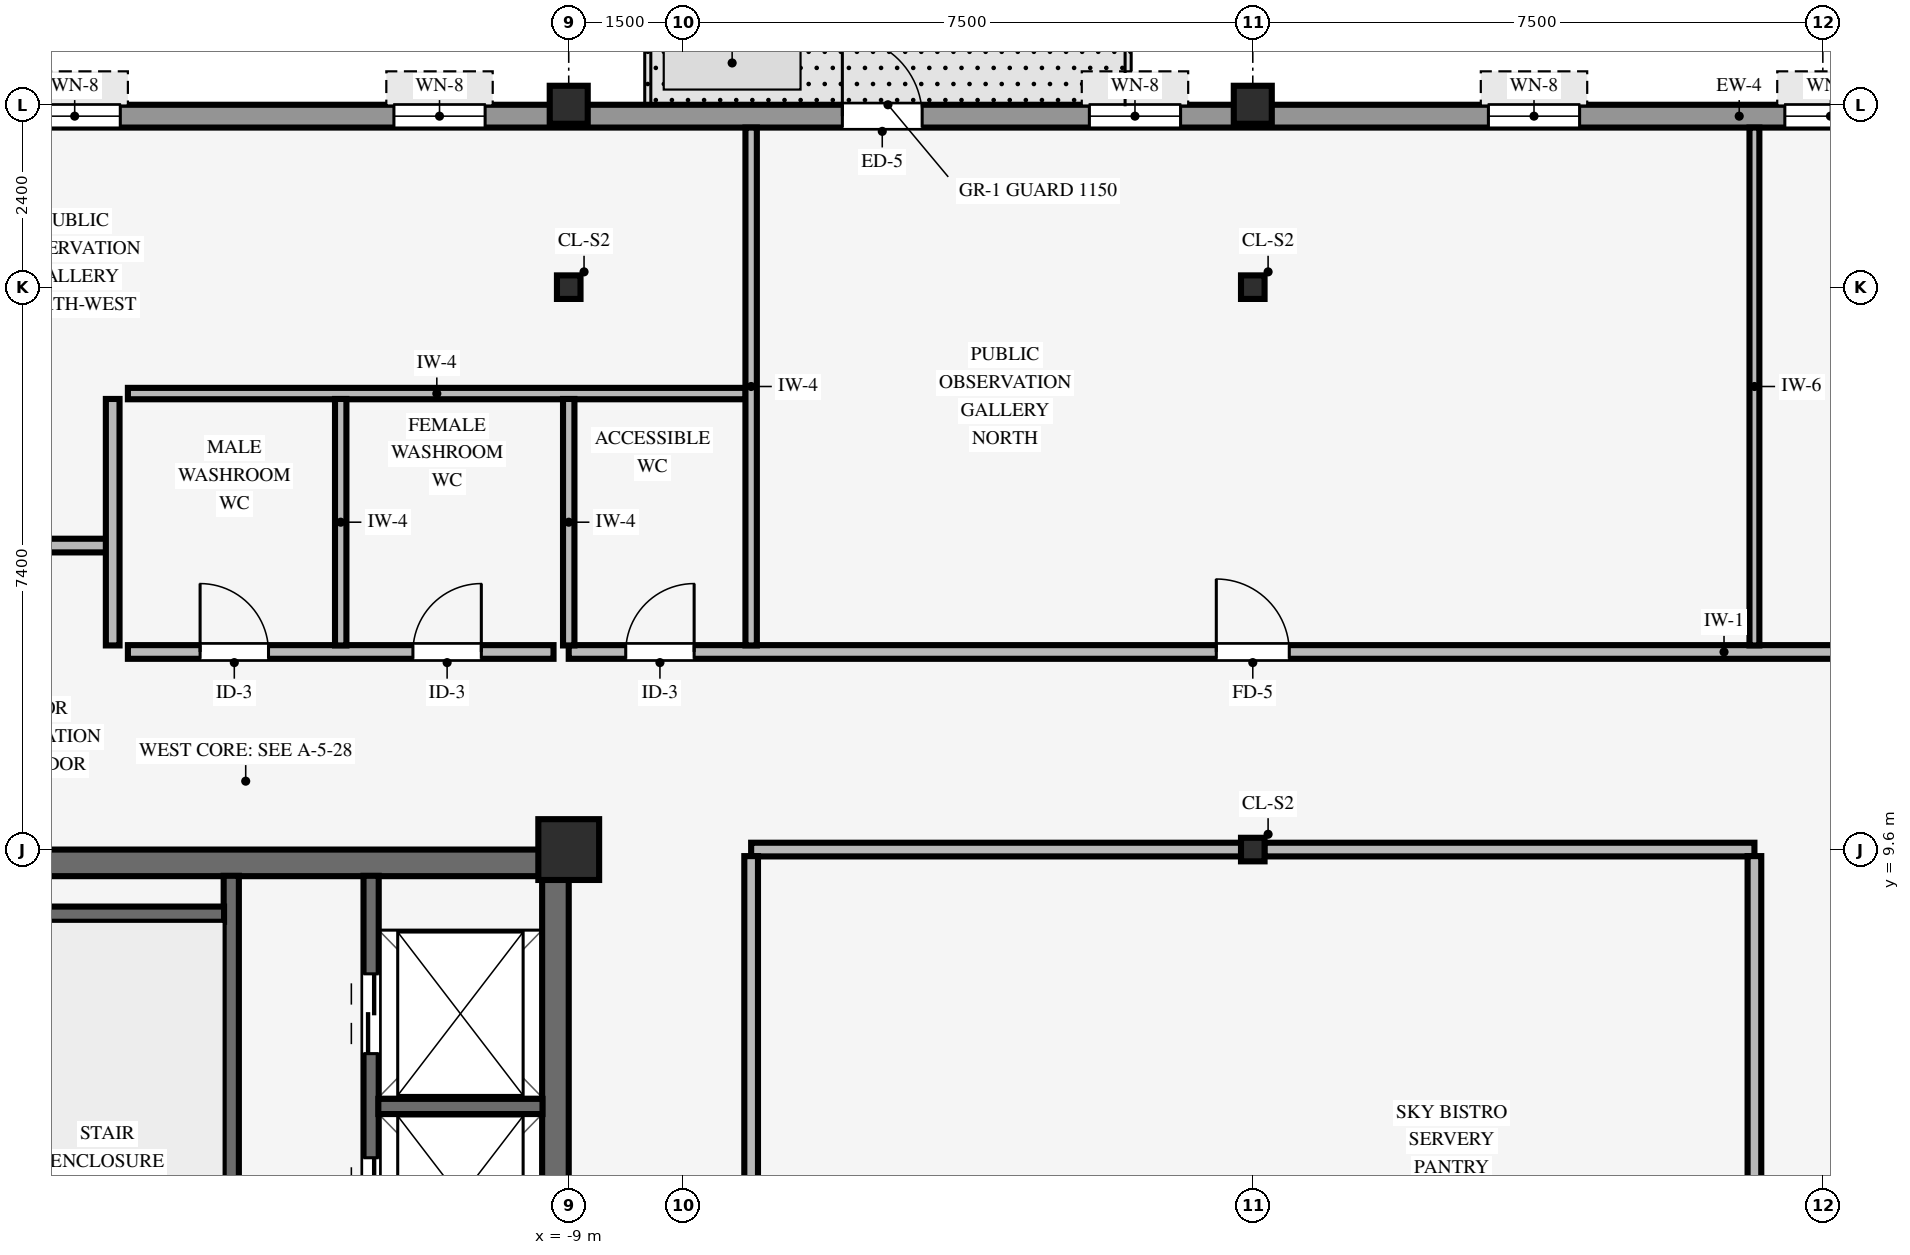
"""IFC4 building model, lengths in metres.
Left out: names, types, materials, properties, quantities, classifications, styles, units other than length and angle.
Written with IfcOpenShell. Run it as: python <this file> out.ifc"""

import sys

from ifc_helpers import new_model, si_unit, direction, frame, frame_2d, origin, origin_2d, place, context, subcontext, project, spatial, rectangle, hollow_rectangle, i_section, extrude, source, transform, mapped, element, fill, save


model = new_model("IFC4")
c1 = context("Model", 3, precision=1e-05, world=origin(), true_north=direction((0.0, 1.0)))
c2 = subcontext(c1, "Body", "Model", "MODEL_VIEW")
j1 = project(units=[si_unit("LENGTHUNIT", "METRE"), si_unit("PLANEANGLEUNIT", "RADIAN")], contexts=[c1])
p1 = place(None, origin())
s1 = spatial("IfcSite", under=j1, at=p1, CompositionType="ELEMENT")
p2 = place(p1, origin())
s2 = spatial("IfcBuilding", under=s1, at=p2, CompositionType="ELEMENT")
p3 = place(p2, frame((0.0, 0.0, 283.5)))
s3 = spatial("IfcBuildingStorey", under=s2, at=p3, CompositionType="ELEMENT", Elevation=283.5)
p4 = place(p3, frame((-17.5, 9.425, 0.0), z_axis=(0.0, 0.0, 1.0), x_axis=(1.0, 0.0, 0.0)))
e1 = element("IfcWall", 1, at=p4, inside=s3, PredefinedType="SHEAR", context=c2, shape_type="SweptSolid", body=[
    extrude(rectangle(XDim=8.5, YDim=0.35, at=frame_2d((4.25, 0.0))), origin(), (0.0, 0.0, 1.0), 3.25),
])
p5 = place(p3, frame((-9.175, -9.255, 0.0), z_axis=(0.0, 0.0, 1.0), x_axis=(0.0, 1.0, 0.0)))
e2 = element("IfcWall", 2, at=p5, inside=s3, PredefinedType="SHEAR", context=c2, shape_type="SweptSolid", body=[
    extrude(rectangle(XDim=18.51, YDim=0.35, at=frame_2d((9.255, 0.0))), origin(), (0.0, 0.0, 1.0), 3.25),
])
p6 = place(p5, frame((8.655, 0.0, 0.0)))
e3 = element("IfcOpeningElement", 3, at=p6, cuts=e2, PredefinedType="OPENING", context=c2, shape_type="SweptSolid", body=[
    extrude(rectangle(XDim=1.2, YDim=2.15, at=frame_2d((0.6, 1.075))), frame((0.0, 0.185, 0.0), z_axis=(0.0, -1.0, 0.0), x_axis=(1.0, 0.0, 0.0)), (0.0, 0.0, 1.0), 0.37),
])
p7 = place(p3, frame((-9.0, 9.6, 0.0), z_axis=(0.0, 0.0, 1.0), x_axis=(1.0, 0.0, 0.0)))
e4 = element("IfcColumn", 4, at=p7, inside=s3, PredefinedType="COLUMN", context=c2, shape_type="SweptSolid", body=[
    extrude(rectangle(XDim=0.8, YDim=0.8, at=origin_2d()), origin(), (0.0, 0.0, 1.0), 3.25),
])
for number, where, z_axis, x_axis in (
    (5, (-9.0, 19.4, 0.0), (0.0, 0.0, 1.0), (1.0, 0.0, 0.0)),
    (6, (0.0, 19.4, 0.0), (0.0, 0.0, 1.0), (1.0, 0.0, 0.0)),
):
    element("IfcColumn", number, at=place(p3, frame(where, z_axis=z_axis, x_axis=x_axis)), inside=s3, PredefinedType="COLUMN", context=c2, shape_type="SweptSolid", body=[
        extrude(hollow_rectangle(XDim=0.5, YDim=0.5, WallThickness=0.032, InnerFilletRadius=0.032, OuterFilletRadius=0.064, at=origin_2d()), origin(), (0.0, 0.0, 1.0), 3.25),
    ])
for number, where, z_axis, x_axis in (
    (7, (0.0, 9.6, 0.0), (0.0, 0.0, 1.0), (1.0, 0.0, 0.0)),
    (8, (0.0, 17.0, 0.0), (0.0, 0.0, 1.0), (1.0, 0.0, 0.0)),
    (9, (-9.0, 17.0, 0.0), (0.0, 0.0, 1.0), (1.0, 0.0, 0.0)),
):
    element("IfcColumn", number, at=place(p3, frame(where, z_axis=z_axis, x_axis=x_axis)), inside=s3, PredefinedType="COLUMN", context=c2, shape_type="SweptSolid", body=[
        extrude(i_section(OverallWidth=0.31, OverallDepth=0.31, WebThickness=0.015, FlangeThickness=0.015, FilletRadius=0.015, at=origin_2d()), origin(), (0.0, 0.0, 1.0), 3.25),
    ])
p8 = place(p3, frame((-18.9, 19.25, 0.0), z_axis=(0.0, 0.0, 1.0), x_axis=(1.0, 0.0, 0.0)))
e10 = element("IfcWall", 10, at=p8, inside=s3, PredefinedType="STANDARD", context=c2, shape_type="SweptSolid", body=[
    extrude(rectangle(XDim=35.6, YDim=0.3, at=frame_2d((17.8, 0.0))), origin(), (0.0, 0.0, 1.0), 3.24),
])
p9 = place(p8, frame((13.5, 0.0, 0.0)))
e11 = element("IfcOpeningElement", 11, at=p9, cuts=e10, PredefinedType="OPENING", context=c2, shape_type="SweptSolid", body=[
    extrude(rectangle(XDim=1.05, YDim=2.1, at=frame_2d((0.525, 1.05))), frame((0.0, 0.16, 0.0), z_axis=(0.0, -1.0, 0.0), x_axis=(1.0, 0.0, 0.0)), (0.0, 0.0, 1.0), 0.32),
])
p10 = place(p8, frame((2.8, 0.0, 0.8)))
e12 = element("IfcOpeningElement", 12, at=p10, cuts=e10, PredefinedType="OPENING", context=c2, shape_type="SweptSolid", body=[
    extrude(rectangle(XDim=1.2, YDim=1.48, at=frame_2d((0.6, 0.74))), frame((0.0, 0.16, 0.0), z_axis=(0.0, -1.0, 0.0), x_axis=(1.0, 0.0, 0.0)), (0.0, 0.0, 1.0), 0.32),
])
p11 = place(p8, frame((7.6, 0.0, 0.8)))
e13 = element("IfcOpeningElement", 13, at=p11, cuts=e10, PredefinedType="OPENING", context=c2, shape_type="SweptSolid", body=[
    extrude(rectangle(XDim=1.2, YDim=1.48, at=frame_2d((0.6, 0.74))), frame((0.0, 0.16, 0.0), z_axis=(0.0, -1.0, 0.0), x_axis=(1.0, 0.0, 0.0)), (0.0, 0.0, 1.0), 0.32),
])
p12 = place(p8, frame((16.75, 0.0, 0.8)))
e14 = element("IfcOpeningElement", 14, at=p12, cuts=e10, PredefinedType="OPENING", context=c2, shape_type="SweptSolid", body=[
    extrude(rectangle(XDim=1.2, YDim=1.48, at=frame_2d((0.6, 0.74))), frame((0.0, 0.16, 0.0), z_axis=(0.0, -1.0, 0.0), x_axis=(1.0, 0.0, 0.0)), (0.0, 0.0, 1.0), 0.32),
])
p13 = place(p8, frame((22.0, 0.0, 0.8)))
e15 = element("IfcOpeningElement", 15, at=p13, cuts=e10, PredefinedType="OPENING", context=c2, shape_type="SweptSolid", body=[
    extrude(rectangle(XDim=1.2, YDim=1.48, at=frame_2d((0.6, 0.74))), frame((0.0, 0.16, 0.0), z_axis=(0.0, -1.0, 0.0), x_axis=(1.0, 0.0, 0.0)), (0.0, 0.0, 1.0), 0.32),
])
p14 = place(p8, frame((25.9, 0.0, 0.8)))
e16 = element("IfcOpeningElement", 16, at=p14, cuts=e10, PredefinedType="OPENING", context=c2, shape_type="SweptSolid", body=[
    extrude(rectangle(XDim=1.2, YDim=1.48, at=frame_2d((0.6, 0.74))), frame((0.0, 0.16, 0.0), z_axis=(0.0, -1.0, 0.0), x_axis=(1.0, 0.0, 0.0)), (0.0, 0.0, 1.0), 0.32),
])
p15 = place(p8, frame((31.6, 0.0, 0.8)))
e17 = element("IfcOpeningElement", 17, at=p15, cuts=e10, PredefinedType="OPENING", context=c2, shape_type="SweptSolid", body=[
    extrude(rectangle(XDim=1.2, YDim=1.48, at=frame_2d((0.6, 0.74))), frame((0.0, 0.16, 0.0), z_axis=(0.0, -1.0, 0.0), x_axis=(1.0, 0.0, 0.0)), (0.0, 0.0, 1.0), 0.32),
])
p16 = place(p3, frame((-13.44, 0.9, 0.0), z_axis=(0.0, 0.0, 1.0), x_axis=(0.0, 1.0, 0.0)))
e18 = element("IfcWall", 18, at=p16, inside=s3, PredefinedType="SHEAR", context=c2, shape_type="SweptSolid", body=[
    extrude(rectangle(XDim=8.355, YDim=0.2, at=frame_2d((4.177, 0.0))), origin(), (0.0, 0.0, 1.0), 3.25),
])
p17 = place(p16, frame((1.53, 0.0, 0.0), z_axis=(0.0, 0.0, 1.0), x_axis=(-1.0, 0.0, 0.0)))
e19 = element("IfcOpeningElement", 19, at=p17, cuts=e18, PredefinedType="OPENING", context=c2, shape_type="SweptSolid", body=[
    extrude(rectangle(XDim=1.1, YDim=2.15, at=frame_2d((0.55, 1.075))), frame((0.0, 0.11, 0.0), z_axis=(0.0, -1.0, 0.0), x_axis=(1.0, 0.0, 0.0)), (0.0, 0.0, 1.0), 0.22),
])
p18 = place(p3, frame((-17.155, 8.75, 0.0), z_axis=(0.0, 0.0, 1.0), x_axis=(1.0, 0.0, 0.0)))
e20 = element("IfcWall", 20, at=p18, inside=s3, PredefinedType="SHEAR", context=c2, shape_type="SweptSolid", body=[
    extrude(rectangle(XDim=3.62, YDim=0.2, at=frame_2d((1.81, 0.0))), origin(), (0.0, 0.0, 1.0), 3.25),
])
p19 = place(p3, frame((-11.6, 1.3, 0.0), z_axis=(0.0, 0.0, 1.0), x_axis=(0.0, 1.0, 0.0)))
e21 = element("IfcWall", 21, at=p19, inside=s3, PredefinedType="SHEAR", context=c2, shape_type="SweptSolid", body=[
    extrude(rectangle(XDim=7.955, YDim=0.2, at=frame_2d((3.978, 0.0))), origin(), (0.0, 0.0, 1.0), 3.25),
])
p20 = place(p19, frame((0.775, 0.0, 0.0)))
e22 = element("IfcOpeningElement", 22, at=p20, cuts=e21, PredefinedType="OPENING", context=c2, shape_type="SweptSolid", body=[
    extrude(rectangle(XDim=1.05, YDim=2.15, at=frame_2d((0.525, 1.075))), frame((0.0, 0.11, 0.0), z_axis=(0.0, -1.0, 0.0), x_axis=(1.0, 0.0, 0.0)), (0.0, 0.0, 1.0), 0.22),
])
p21 = place(p19, frame((3.195, 0.0, 0.0)))
e23 = element("IfcOpeningElement", 23, at=p21, cuts=e21, PredefinedType="OPENING", context=c2, shape_type="SweptSolid", body=[
    extrude(rectangle(XDim=1.05, YDim=2.15, at=frame_2d((0.525, 1.075))), frame((0.0, 0.11, 0.0), z_axis=(0.0, -1.0, 0.0), x_axis=(1.0, 0.0, 0.0)), (0.0, 0.0, 1.0), 0.22),
])
p22 = place(p19, frame((5.615, 0.0, 0.0)))
e24 = element("IfcOpeningElement", 24, at=p22, cuts=e21, PredefinedType="OPENING", context=c2, shape_type="SweptSolid", body=[
    extrude(rectangle(XDim=1.05, YDim=2.15, at=frame_2d((0.525, 1.075))), frame((0.0, 0.11, 0.0), z_axis=(0.0, -1.0, 0.0), x_axis=(1.0, 0.0, 0.0)), (0.0, 0.0, 1.0), 0.22),
])
p23 = place(p3, frame((-11.505, 6.22, 0.0), z_axis=(0.0, 0.0, 1.0), x_axis=(1.0, 0.0, 0.0)))
e25 = element("IfcWall", 25, at=p23, inside=s3, PredefinedType="SHEAR", context=c2, shape_type="SweptSolid", body=[
    extrude(rectangle(XDim=2.16, YDim=0.2, at=frame_2d((1.08, 0.0))), origin(), (0.0, 0.0, 1.0), 3.25),
])
for number, where, z_axis, x_axis in (
    (26, (-6.6, 9.6, 0.0), (0.0, 0.0, 1.0), (1.0, 0.0, 0.0)),
    (27, (0.151, 9.6, 0.0), (0.0, 0.0, 1.0), (1.0, 0.0, 0.0)),
):
    element("IfcWall", number, at=place(p3, frame(where, z_axis=z_axis, x_axis=x_axis)), inside=s3, PredefinedType="PARTITIONING", context=c2, shape_type="SweptSolid", body=[
        extrude(rectangle(XDim=6.449, YDim=0.18, at=frame_2d((3.225, 0.0))), origin(), (0.0, 0.0, 1.0), 2.285),
    ])
p24 = place(p3, frame((-14.8, 12.2, 0.0), z_axis=(0.0, 0.0, 1.0), x_axis=(1.0, 0.0, 0.0)))
e28 = element("IfcWall", 28, at=p24, inside=s3, PredefinedType="PARTITIONING", context=c2, shape_type="SweptSolid", body=[
    extrude(rectangle(XDim=5.6, YDim=0.18, at=frame_2d((2.8, 0.0))), origin(), (0.0, 0.0, 1.0), 3.24),
])
p25 = place(p24, frame((0.95, 0.0, 0.0)))
e29 = element("IfcOpeningElement", 29, at=p25, cuts=e28, PredefinedType="OPENING", context=c2, shape_type="SweptSolid", body=[
    extrude(rectangle(XDim=0.9, YDim=2.1, at=frame_2d((0.45, 1.05))), frame((0.0, 0.1, 0.0), z_axis=(0.0, -1.0, 0.0), x_axis=(1.0, 0.0, 0.0)), (0.0, 0.0, 1.0), 0.2),
])
p26 = place(p24, frame((3.75, 0.0, 0.0)))
e30 = element("IfcOpeningElement", 30, at=p26, cuts=e28, PredefinedType="OPENING", context=c2, shape_type="SweptSolid", body=[
    extrude(rectangle(XDim=0.9, YDim=2.1, at=frame_2d((0.45, 1.05))), frame((0.0, 0.1, 0.0), z_axis=(0.0, -1.0, 0.0), x_axis=(1.0, 0.0, 0.0)), (0.0, 0.0, 1.0), 0.2),
])
p27 = place(p3, frame((-9.0, 12.2, 0.0), z_axis=(0.0, 0.0, 1.0), x_axis=(1.0, 0.0, 0.0)))
e31 = element("IfcWall", 31, at=p27, inside=s3, PredefinedType="PARTITIONING", context=c2, shape_type="SweptSolid", body=[
    extrude(rectangle(XDim=24.8, YDim=0.18, at=frame_2d((12.4, 0.0))), origin(), (0.0, 0.0, 1.0), 3.24),
])
p28 = place(p27, frame((8.52, 0.0, 0.0)))
e32 = element("IfcOpeningElement", 32, at=p28, cuts=e31, PredefinedType="OPENING", context=c2, shape_type="SweptSolid", body=[
    extrude(rectangle(XDim=0.96, YDim=2.1, at=frame_2d((0.48, 1.05))), frame((0.0, 0.1, 0.0), z_axis=(0.0, -1.0, 0.0), x_axis=(1.0, 0.0, 0.0)), (0.0, 0.0, 1.0), 0.2),
])
p29 = place(p27, frame((20.92, 0.0, 0.0)))
e33 = element("IfcOpeningElement", 33, at=p29, cuts=e31, PredefinedType="OPENING", context=c2, shape_type="SweptSolid", body=[
    extrude(rectangle(XDim=0.96, YDim=2.1, at=frame_2d((0.48, 1.05))), frame((0.0, 0.1, 0.0), z_axis=(0.0, -1.0, 0.0), x_axis=(1.0, 0.0, 0.0)), (0.0, 0.0, 1.0), 0.2),
])
p30 = place(p27, frame((0.75, 0.0, 0.0)))
e34 = element("IfcOpeningElement", 34, at=p30, cuts=e31, PredefinedType="OPENING", context=c2, shape_type="SweptSolid", body=[
    extrude(rectangle(XDim=0.9, YDim=2.1, at=frame_2d((0.45, 1.05))), frame((0.0, 0.1, 0.0), z_axis=(0.0, -1.0, 0.0), x_axis=(1.0, 0.0, 0.0)), (0.0, 0.0, 1.0), 0.2),
])
p31 = place(p3, frame((-20.0, 13.6, 0.0), z_axis=(0.0, 0.0, 1.0), x_axis=(1.0, 0.0, 0.0)))
e35 = element("IfcWall", 35, at=p31, inside=s3, PredefinedType="PARTITIONING", context=c2, shape_type="SweptSolid", body=[
    extrude(rectangle(XDim=4.914, YDim=0.18, at=frame_2d((2.457, 0.0))), origin(), (0.0, 0.0, 1.0), 3.24),
])
p32 = place(p31, frame((1.977, 0.0, 0.0)))
e36 = element("IfcOpeningElement", 36, at=p32, cuts=e35, PredefinedType="OPENING", context=c2, shape_type="SweptSolid", body=[
    extrude(rectangle(XDim=0.96, YDim=2.1, at=frame_2d((0.48, 1.05))), frame((0.0, 0.1, 0.0), z_axis=(0.0, -1.0, 0.0), x_axis=(1.0, 0.0, 0.0)), (0.0, 0.0, 1.0), 0.2),
])
p33 = place(p3, frame((-14.8, 15.6, 0.0), z_axis=(0.0, 0.0, 1.0), x_axis=(1.0, 0.0, 0.0)))
e37 = element("IfcWall", 37, at=p33, inside=s3, PredefinedType="PARTITIONING", context=c2, shape_type="SweptSolid", body=[
    extrude(rectangle(XDim=8.129, YDim=0.15, at=frame_2d((4.064, 0.0))), origin(), (0.0, 0.0, 1.0), 3.24),
])
p34 = place(p3, frame((-15.0, 12.286, 0.0), z_axis=(0.0, 0.0, 1.0), x_axis=(0.0, 1.0, 0.0)))
e38 = element("IfcWall", 38, at=p34, inside=s3, PredefinedType="PARTITIONING", context=c2, shape_type="SweptSolid", body=[
    extrude(rectangle(XDim=3.243, YDim=0.18, at=frame_2d((1.622, 0.0))), origin(), (0.0, 0.0, 1.0), 3.24),
])
p35 = place(p3, frame((-12.0, 12.286, 0.0), z_axis=(0.0, 0.0, 1.0), x_axis=(0.0, 1.0, 0.0)))
e39 = element("IfcWall", 39, at=p35, inside=s3, PredefinedType="PARTITIONING", context=c2, shape_type="SweptSolid", body=[
    extrude(rectangle(XDim=3.243, YDim=0.15, at=frame_2d((1.622, 0.0))), origin(), (0.0, 0.0, 1.0), 3.24),
])
p36 = place(p3, frame((-9.0, 12.286, 0.0), z_axis=(0.0, 0.0, 1.0), x_axis=(0.0, 1.0, 0.0)))
e40 = element("IfcWall", 40, at=p36, inside=s3, PredefinedType="PARTITIONING", context=c2, shape_type="SweptSolid", body=[
    extrude(rectangle(XDim=3.243, YDim=0.15, at=frame_2d((1.622, 0.0))), origin(), (0.0, 0.0, 1.0), 2.772),
])
p37 = place(p3, frame((-6.6, 1.336, 0.0), z_axis=(0.0, 0.0, 1.0), x_axis=(0.0, 1.0, 0.0)))
e41 = element("IfcWall", 41, at=p37, inside=s3, PredefinedType="PARTITIONING", context=c2, shape_type="SweptSolid", body=[
    extrude(rectangle(XDim=8.178, YDim=0.18, at=frame_2d((4.089, 0.0))), origin(), (0.0, 0.0, 1.0), 3.24),
])
p38 = place(p3, frame((-6.6, 12.286, 0.0), z_axis=(0.0, 0.0, 1.0), x_axis=(0.0, 1.0, 0.0)))
e42 = element("IfcWall", 42, at=p38, inside=s3, PredefinedType="PARTITIONING", context=c2, shape_type="SweptSolid", body=[
    extrude(rectangle(XDim=6.814, YDim=0.15, at=frame_2d((3.407, 0.0))), origin(), (0.0, 0.0, 1.0), 3.24),
])
p39 = place(p3, frame((6.6, 1.336, 0.0), z_axis=(0.0, 0.0, 1.0), x_axis=(0.0, 1.0, 0.0)))
e43 = element("IfcWall", 43, at=p39, inside=s3, PredefinedType="PARTITIONING", context=c2, shape_type="SweptSolid", body=[
    extrude(rectangle(XDim=8.178, YDim=0.18, at=frame_2d((4.089, 0.0))), origin(), (0.0, 0.0, 1.0), 3.24),
])
p40 = place(p3, frame((6.6, 12.286, 0.0), z_axis=(0.0, 0.0, 1.0), x_axis=(0.0, 1.0, 0.0)))
e44 = element("IfcWall", 44, at=p40, inside=s3, PredefinedType="PARTITIONING", context=c2, shape_type="SweptSolid", body=[
    extrude(rectangle(XDim=6.814, YDim=0.13, at=frame_2d((3.407, 0.0))), origin(), (0.0, 0.0, 1.0), 3.24),
])
m1 = source(origin(), c2, "Body", "SweptSolid", [
    extrude(rectangle(XDim=1.05, YDim=2.1, at=frame_2d((0.525, 1.05))), frame((0.0, 0.025, 0.0), z_axis=(0.0, -1.0, 0.0), x_axis=(1.0, 0.0, 0.0)), (0.0, 0.0, 1.0), 0.05),
])
p41 = place(p9, origin())
e45 = element("IfcDoor", 45, at=p41, inside=s3, OperationType="SINGLE_SWING_LEFT", PredefinedType="DOOR", context=c2, shape_type="MappedRepresentation", body=[
    mapped(m1, transform((0.0, 0.0, 0.0), scale=1.0)),
])
fill(e11, e45)
m2 = source(origin(), c2, "Body", "SweptSolid", [
    extrude(rectangle(XDim=1.2, YDim=1.48, at=frame_2d((0.6, 0.74))), frame((0.0, 0.03, 0.0), z_axis=(0.0, -1.0, 0.0), x_axis=(1.0, 0.0, 0.0)), (0.0, 0.0, 1.0), 0.06),
])
p42 = place(p10, origin())
e46 = element("IfcWindow", 46, at=p42, inside=s3, PartitioningType="SINGLE_PANEL", PredefinedType="WINDOW", context=c2, shape_type="MappedRepresentation", body=[
    mapped(m2, transform((0.0, 0.0, 0.0), scale=1.0)),
])
fill(e12, e46)
p43 = place(p11, origin())
e47 = element("IfcWindow", 47, at=p43, inside=s3, PartitioningType="SINGLE_PANEL", PredefinedType="WINDOW", context=c2, shape_type="MappedRepresentation", body=[
    mapped(m2, transform((0.0, 0.0, 0.0), scale=1.0)),
])
fill(e13, e47)
p44 = place(p12, origin())
e48 = element("IfcWindow", 48, at=p44, inside=s3, PartitioningType="SINGLE_PANEL", PredefinedType="WINDOW", context=c2, shape_type="MappedRepresentation", body=[
    mapped(m2, transform((0.0, 0.0, 0.0), scale=1.0)),
])
fill(e14, e48)
p45 = place(p13, origin())
e49 = element("IfcWindow", 49, at=p45, inside=s3, PartitioningType="SINGLE_PANEL", PredefinedType="WINDOW", context=c2, shape_type="MappedRepresentation", body=[
    mapped(m2, transform((0.0, 0.0, 0.0), scale=1.0)),
])
fill(e15, e49)
p46 = place(p14, origin())
e50 = element("IfcWindow", 50, at=p46, inside=s3, PartitioningType="SINGLE_PANEL", PredefinedType="WINDOW", context=c2, shape_type="MappedRepresentation", body=[
    mapped(m2, transform((0.0, 0.0, 0.0), scale=1.0)),
])
fill(e16, e50)
m3 = source(origin(), c2, "Body", "SweptSolid", [
    extrude(rectangle(XDim=1.05, YDim=2.15, at=frame_2d((0.525, 1.075))), frame((0.0, 0.025, 0.0), z_axis=(0.0, -1.0, 0.0), x_axis=(1.0, 0.0, 0.0)), (0.0, 0.0, 1.0), 0.05),
])
p47 = place(p21, origin())
e51 = element("IfcDoor", 51, at=p47, inside=s3, OperationType="DOUBLE_DOOR_SLIDING", PredefinedType="DOOR", context=c2, shape_type="MappedRepresentation", body=[
    mapped(m3, transform((0.0, 0.0, 0.0), scale=1.0)),
])
fill(e23, e51)
p48 = place(p22, origin())
e52 = element("IfcDoor", 52, at=p48, inside=s3, OperationType="DOUBLE_DOOR_SLIDING", PredefinedType="DOOR", context=c2, shape_type="MappedRepresentation", body=[
    mapped(m3, transform((0.0, 0.0, 0.0), scale=1.0)),
])
fill(e24, e52)
m4 = source(origin(), c2, "Body", "SweptSolid", [
    extrude(rectangle(XDim=0.96, YDim=2.1, at=frame_2d((0.48, 1.05))), frame((0.0, 0.025, 0.0), z_axis=(0.0, -1.0, 0.0), x_axis=(1.0, 0.0, 0.0)), (0.0, 0.0, 1.0), 0.05),
])
p49 = place(p28, origin())
e53 = element("IfcDoor", 53, at=p49, inside=s3, OperationType="SINGLE_SWING_LEFT", PredefinedType="DOOR", context=c2, shape_type="MappedRepresentation", body=[
    mapped(m4, transform((0.0, 0.0, 0.0), scale=1.0)),
])
fill(e32, e53)
m5 = source(origin(), c2, "Body", "SweptSolid", [
    extrude(rectangle(XDim=0.9, YDim=2.1, at=frame_2d((0.45, 1.05))), frame((0.0, 0.025, 0.0), z_axis=(0.0, -1.0, 0.0), x_axis=(1.0, 0.0, 0.0)), (0.0, 0.0, 1.0), 0.05),
])
p50 = place(p25, origin())
e54 = element("IfcDoor", 54, at=p50, inside=s3, OperationType="SINGLE_SWING_LEFT", PredefinedType="DOOR", context=c2, shape_type="MappedRepresentation", body=[
    mapped(m5, transform((0.0, 0.0, 0.0), scale=1.0)),
])
fill(e29, e54)
p51 = place(p26, origin())
e55 = element("IfcDoor", 55, at=p51, inside=s3, OperationType="SINGLE_SWING_RIGHT", PredefinedType="DOOR", context=c2, shape_type="MappedRepresentation", body=[
    mapped(m5, transform((0.0, 0.0, 0.0), scale=1.0)),
])
fill(e30, e55)
p52 = place(p30, origin())
e56 = element("IfcDoor", 56, at=p52, inside=s3, OperationType="SINGLE_SWING_RIGHT", PredefinedType="DOOR", context=c2, shape_type="MappedRepresentation", body=[
    mapped(m5, transform((0.0, 0.0, 0.0), scale=1.0)),
])
fill(e34, e56)
save(model, sys.argv[1])
